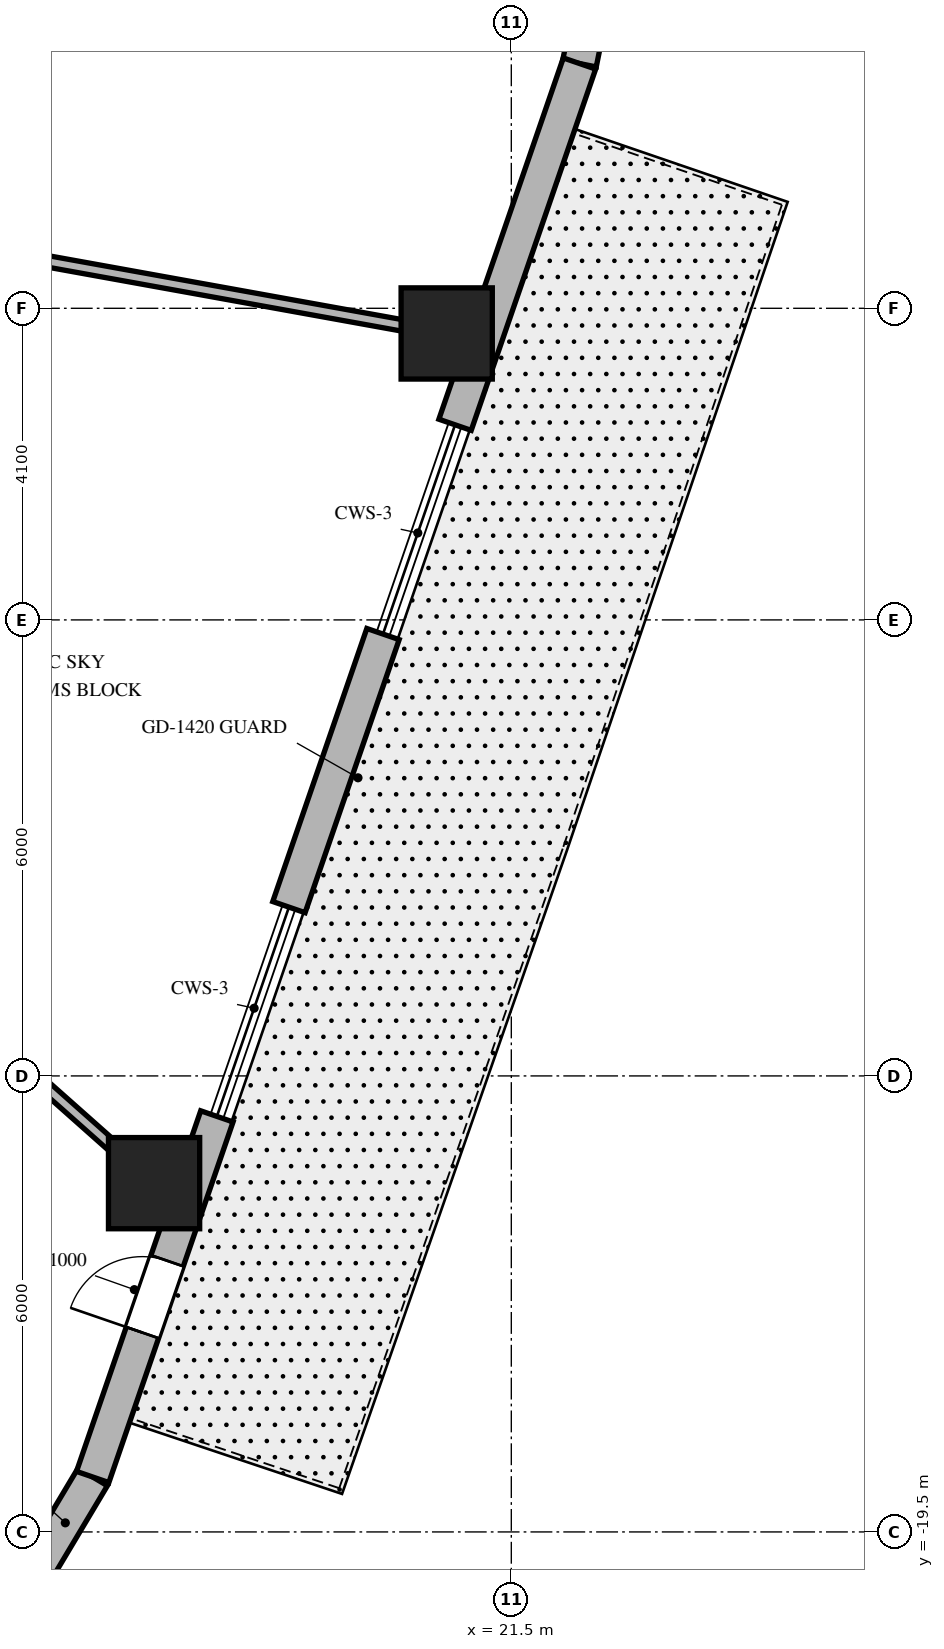
"""IFC4 building model, lengths in metres.
Left out: names, types, materials, properties, quantities, classifications, styles, units other than length and angle.
Written with IfcOpenShell. Run it as: python <this file> out.ifc"""

import sys

from ifc_helpers import new_model, si_unit, direction, frame, frame_2d, origin, origin_2d, place, context, subcontext, project, spatial, rectangle, extrude, element, fill, save


model = new_model("IFC4")
c1 = context("Model", 3, precision=1e-05, world=origin(), true_north=direction((0.0, 1.0)))
c2 = subcontext(c1, "Body", "Model", "MODEL_VIEW")
j1 = project(units=[si_unit("LENGTHUNIT", "METRE"), si_unit("PLANEANGLEUNIT", "RADIAN")], contexts=[c1])
p1 = place(None, origin())
s1 = spatial("IfcSite", under=j1, at=p1, CompositionType="ELEMENT")
p2 = place(p1, origin())
s2 = spatial("IfcBuilding", under=s1, at=p2, CompositionType="ELEMENT")
p3 = place(p2, frame((0.0, 0.0, 139.5)))
s3 = spatial("IfcBuildingStorey", under=s2, at=p3, CompositionType="ELEMENT", Elevation=139.5)
for number, where, z_axis, x_axis in (
    (1, (16.8, -14.911, 0.0), (0.0, 0.0, 1.0), (1.0, 0.0, 0.0)),
    (2, (20.65, -3.731, 0.0), (0.0, 0.0, 1.0), (1.0, 0.0, 0.0)),
):
    element("IfcColumn", number, at=place(p3, frame(where, z_axis=z_axis, x_axis=x_axis)), inside=s3, PredefinedType="COLUMN", context=c2, shape_type="SweptSolid", body=[
        extrude(rectangle(XDim=1.2, YDim=1.2, at=origin_2d()), origin(), (0.0, 0.0, 1.0), 4.8),
    ])
p4 = place(p3, frame((15.272, -19.984, 0.0), z_axis=(0.0, 0.0, 1.0), x_axis=(0.512579347361, 0.858639862025, 0.0)))
e3 = element("IfcWall", 3, at=p4, inside=s3, PredefinedType="SOLIDWALL", context=c2, shape_type="SweptSolid", body=[
    extrude(rectangle(XDim=1.406, YDim=0.45, at=frame_2d((0.703, 0.0))), origin(), (0.0, 0.0, 1.0), 4.5),
])
p5 = place(p3, frame((22.397, -0.179, 0.0), z_axis=(0.0, 0.0, 1.0), x_axis=(0.199313589404, 0.979935759669, 0.0)))
e4 = element("IfcWall", 4, at=p5, inside=s3, PredefinedType="SOLIDWALL", context=c2, shape_type="SweptSolid", body=[
    extrude(rectangle(XDim=0.896, YDim=0.45, at=frame_2d((0.448, 0.0))), origin(), (0.0, 0.0, 1.0), 4.5),
])
p6 = place(p3, frame((15.992, -18.777, 0.0), z_axis=(0.0, 0.0, 1.0), x_axis=(0.325626313688, 0.945498547769, 0.0)))
e5 = element("IfcWall", 5, at=p6, inside=s3, PredefinedType="SOLIDWALL", context=c2, shape_type="SweptSolid", body=[
    extrude(rectangle(XDim=5.018, YDim=0.45, at=frame_2d((2.509, 0.0))), origin(), (0.0, 0.0, 1.0), 4.5),
])
p7 = place(p6, frame((2.009, 0.0, 0.0)))
e6 = element("IfcOpeningElement", 6, at=p7, cuts=e5, PredefinedType="OPENING", context=c2, shape_type="SweptSolid", body=[
    extrude(rectangle(XDim=1.0, YDim=2.15, at=frame_2d((0.5, 1.075))), frame((0.0, 0.235, 0.0), z_axis=(0.0, -1.0, 0.0), x_axis=(1.0, 0.0, 0.0)), (0.0, 0.0, 1.0), 0.47),
])
p8 = place(p3, frame((18.574, -11.279, 0.0), z_axis=(0.0, 0.0, 1.0), x_axis=(0.325598625093, 0.945508083169, 0.0)))
e7 = element("IfcWall", 7, at=p8, inside=s3, PredefinedType="SOLIDWALL", context=c2, shape_type="SweptSolid", body=[
    extrude(rectangle(XDim=3.8, YDim=0.45, at=frame_2d((1.9, 0.0))), origin(), (0.0, 0.0, 1.0), 4.5),
])
p9 = place(p3, frame((20.76, -4.933, 0.0), z_axis=(0.0, 0.0, 1.0), x_axis=(0.325594073587, 0.94550965053, 0.0)))
e8 = element("IfcWall", 8, at=p9, inside=s3, PredefinedType="SOLIDWALL", context=c2, shape_type="SweptSolid", body=[
    extrude(rectangle(XDim=5.028, YDim=0.45, at=frame_2d((2.514, 0.0))), origin(), (0.0, 0.0, 1.0), 4.5),
])
p10 = place(p3, frame((11.098, -9.85, 0.0), z_axis=(0.0, 0.0, 1.0), x_axis=(0.747904295103, -0.663806572253, 0.0)))
e9 = element("IfcWall", 9, at=p10, inside=s3, PredefinedType="PARTITIONING", context=c2, shape_type="SweptSolid", body=[
    extrude(rectangle(XDim=8.16, YDim=0.15, at=frame_2d((4.08, 0.0))), origin(), (0.0, 0.0, 1.0), 2.69),
])
p11 = place(p3, frame((11.35, -2.051, 0.0), z_axis=(0.0, 0.0, 1.0), x_axis=(0.984068313063, -0.177790762484, 0.0)))
e10 = element("IfcWall", 10, at=p11, inside=s3, PredefinedType="PARTITIONING", context=c2, shape_type="SweptSolid", body=[
    extrude(rectangle(XDim=9.951, YDim=0.15, at=frame_2d((4.976, 0.0))), origin(), (0.0, 0.0, 1.0), 2.69),
])
p12 = place(p7, origin())
e11 = element("IfcDoor", 11, at=p12, inside=s3, OperationType="SINGLE_SWING_LEFT", PredefinedType="DOOR", context=c2, shape_type="SweptSolid", body=[
    extrude(rectangle(XDim=1.0, YDim=2.15, at=frame_2d((0.5, 1.075))), frame((0.0, 0.025, 0.0), z_axis=(0.0, -1.0, 0.0), x_axis=(1.0, 0.0, 0.0)), (0.0, 0.0, 1.0), 0.05),
])
fill(e6, e11)
save(model, sys.argv[1])
